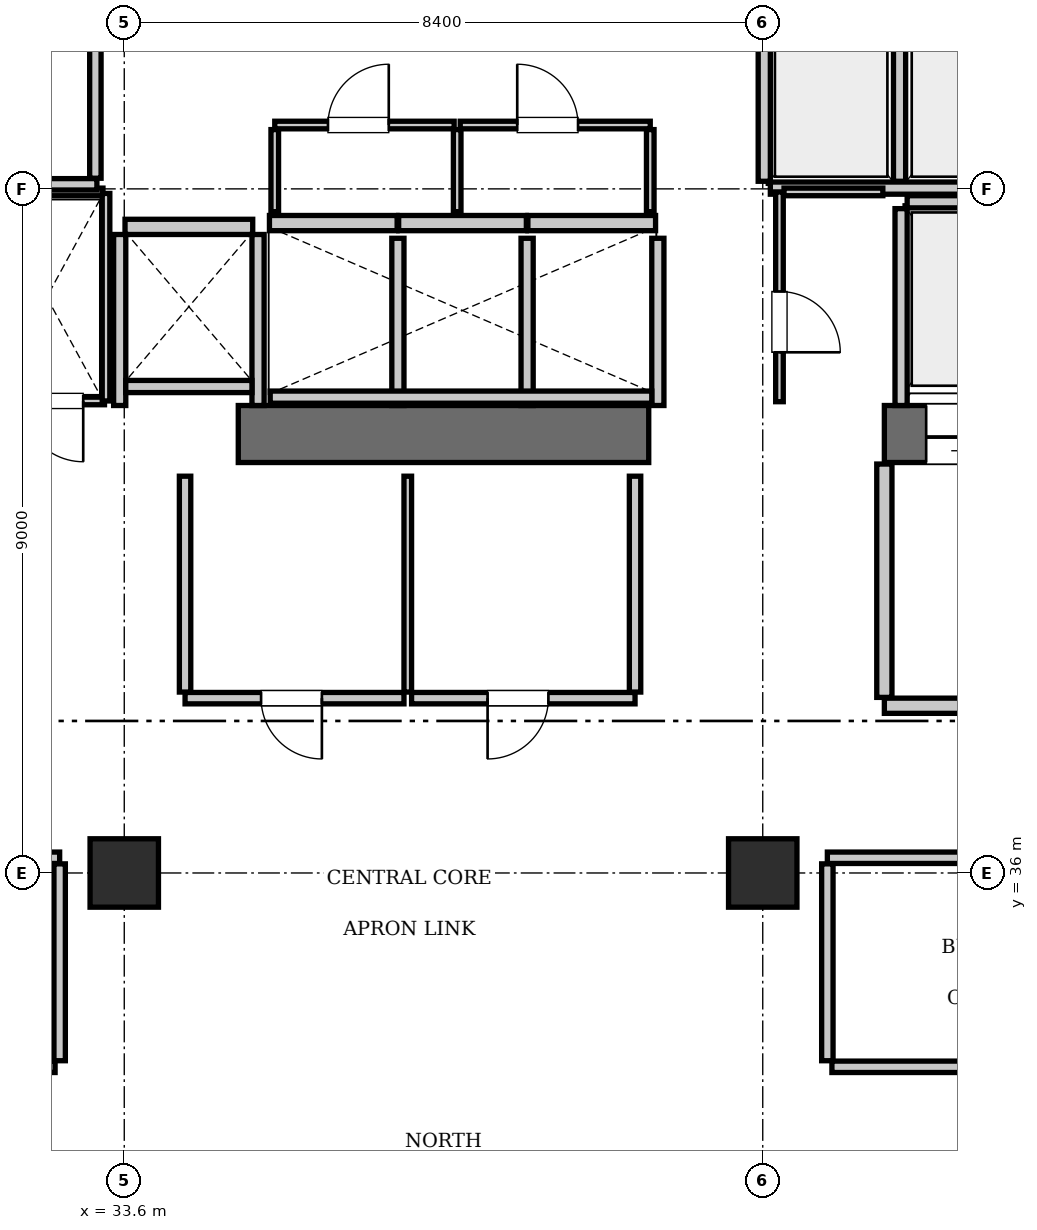
"""IFC4 building model, lengths in metres.
Left out: names, types, materials, properties, quantities, classifications, styles, units other than length and angle.
Written with IfcOpenShell. Run it as: python <this file> out.ifc"""

import sys

from ifc_helpers import new_model, si_unit, direction, frame, frame_2d, origin, origin_2d, place, context, subcontext, project, spatial, rectangle, extrude, element, fill, save


model = new_model("IFC4")
c1 = context("Model", 3, precision=1e-05, world=origin(), true_north=direction((0.0, 1.0)))
c2 = subcontext(c1, "Body", "Model", "MODEL_VIEW")
j1 = project(units=[si_unit("LENGTHUNIT", "METRE"), si_unit("PLANEANGLEUNIT", "RADIAN")], contexts=[c1])
p1 = place(None, origin())
s1 = spatial("IfcSite", under=j1, at=p1, CompositionType="ELEMENT")
p2 = place(p1, origin())
s2 = spatial("IfcBuilding", under=s1, at=p2, CompositionType="ELEMENT")
p3 = place(p2, frame((0.0, 0.0, 135.1)))
s3 = spatial("IfcBuildingStorey", under=s2, at=p3, CompositionType="ELEMENT", Elevation=135.1)
p4 = place(p3, frame((35.1, 41.775, 0.0), z_axis=(0.0, 0.0, 1.0), x_axis=(1.0, 0.0, 0.0)))
e1 = element("IfcWall", 1, at=p4, inside=s3, PredefinedType="SHEAR", context=c2, shape_type="SweptSolid", body=[
    extrude(rectangle(XDim=5.4, YDim=0.75, at=frame_2d((2.7, 0.0))), origin(), (0.0, 0.0, 1.0), 3.85),
])
p5 = place(p3, frame((43.6, 41.775, 0.0), z_axis=(0.0, 0.0, 1.0), x_axis=(1.0, 0.0, 0.0)))
e2 = element("IfcWall", 2, at=p5, inside=s3, PredefinedType="SHEAR", context=c2, shape_type="SweptSolid", body=[
    extrude(rectangle(XDim=6.8, YDim=0.75, at=frame_2d((3.4, 0.0))), origin(), (0.0, 0.0, 1.0), 3.85),
])
p6 = place(p5, frame((3.9, 0.0, 0.0)))
e3 = element("IfcOpeningElement", 3, at=p6, cuts=e2, PredefinedType="OPENING", context=c2, shape_type="SweptSolid", body=[
    extrude(rectangle(XDim=1.15, YDim=2.15, at=frame_2d((0.575, 1.075))), frame((0.0, 0.385, 0.0), z_axis=(0.0, -1.0, 0.0), x_axis=(1.0, 0.0, 0.0)), (0.0, 0.0, 1.0), 0.77),
])
p7 = place(p5, frame((0.55, 0.0, 0.0)))
e4 = element("IfcOpeningElement", 4, at=p7, cuts=e2, PredefinedType="OPENING", context=c2, shape_type="SweptSolid", body=[
    extrude(rectangle(XDim=1.1, YDim=2.2, at=frame_2d((0.55, 1.1))), frame((0.0, 0.385, 0.0), z_axis=(0.0, -1.0, 0.0), x_axis=(1.0, 0.0, 0.0)), (0.0, 0.0, 1.0), 0.77),
])
for number, where, z_axis, x_axis in (
    (5, (33.6, 36.0, 0.0), (0.0, 0.0, 1.0), (1.0, 0.0, 0.0)),
    (6, (42.0, 36.0, 0.0), (0.0, 0.0, 1.0), (1.0, 0.0, 0.0)),
):
    element("IfcColumn", number, at=place(p3, frame(where, z_axis=z_axis, x_axis=x_axis)), inside=s3, PredefinedType="COLUMN", context=c2, shape_type="SweptSolid", body=[
        extrude(rectangle(XDim=0.9, YDim=0.9, at=origin_2d()), origin(), (0.0, 0.0, 1.0), 3.85),
    ])
for number, where, z_axis, x_axis in (
    (7, (35.51, 44.55, 0.0), (0.0, 0.0, 1.0), (1.0, 0.0, 0.0)),
    (8, (37.21, 44.55, 0.0), (0.0, 0.0, 1.0), (1.0, 0.0, 0.0)),
):
    element("IfcWall", number, at=place(p3, frame(where, z_axis=z_axis, x_axis=x_axis)), inside=s3, PredefinedType="SOLIDWALL", context=c2, shape_type="SweptSolid", body=[
        extrude(rectangle(XDim=1.68, YDim=0.2, at=frame_2d((0.84, 0.0))), origin(), (0.0, 0.0, 1.0), 3.61),
    ])
p8 = place(p3, frame((38.91, 44.55, 0.0), z_axis=(0.0, 0.0, 1.0), x_axis=(1.0, 0.0, 0.0)))
e9 = element("IfcWall", 9, at=p8, inside=s3, PredefinedType="SOLIDWALL", context=c2, shape_type="SweptSolid", body=[
    extrude(rectangle(XDim=1.68, YDim=0.2, at=frame_2d((0.84, 0.0))), origin(), (0.0, 0.0, 1.0), 3.61),
])
p9 = place(p3, frame((33.61, 44.5, 0.0), z_axis=(0.0, 0.0, 1.0), x_axis=(1.0, 0.0, 0.0)))
e10 = element("IfcWall", 10, at=p9, inside=s3, PredefinedType="SOLIDWALL", context=c2, shape_type="SweptSolid", body=[
    extrude(rectangle(XDim=1.68, YDim=0.2, at=frame_2d((0.84, 0.0))), origin(), (0.0, 0.0, 1.0), 3.61),
])
p10 = place(p3, frame((43.9, 44.83, 0.0), z_axis=(0.0, 0.0, 1.0), x_axis=(1.0, 0.0, 0.0)))
e11 = element("IfcWall", 11, at=p10, inside=s3, PredefinedType="SOLIDWALL", context=c2, shape_type="SweptSolid", body=[
    extrude(rectangle(XDim=1.6, YDim=0.16, at=frame_2d((0.8, 0.0))), origin(), (0.0, 0.0, 1.0), 3.61),
])
p11 = place(p3, frame((43.82, 42.15, 0.0), z_axis=(0.0, 0.0, 1.0), x_axis=(0.0, 1.0, 0.0)))
e12 = element("IfcWall", 12, at=p11, inside=s3, PredefinedType="SOLIDWALL", context=c2, shape_type="SweptSolid", body=[
    extrude(rectangle(XDim=2.59, YDim=0.16, at=frame_2d((1.295, 0.0))), origin(), (0.0, 0.0, 1.0), 3.61),
])
for number, where, z_axis, x_axis in (
    (13, (42.02, 45.1, 0.0), (0.0, 0.0, 1.0), (0.0, 1.0, 0.0)),
    (14, (43.8, 45.1, 0.0), (0.0, 0.0, 1.0), (0.0, 1.0, 0.0)),
):
    element("IfcWall", number, at=place(p3, frame(where, z_axis=z_axis, x_axis=x_axis)), inside=s3, PredefinedType="SOLIDWALL", context=c2, shape_type="SweptSolid", body=[
        extrude(rectangle(XDim=1.95, YDim=0.16, at=frame_2d((0.975, 0.0))), origin(), (0.0, 0.0, 1.0), 3.61),
    ])
p12 = place(p3, frame((42.1, 45.01, 0.0), z_axis=(0.0, 0.0, 1.0), x_axis=(1.0, 0.0, 0.0)))
e15 = element("IfcWall", 15, at=p12, inside=s3, PredefinedType="SOLIDWALL", context=c2, shape_type="SweptSolid", body=[
    extrude(rectangle(XDim=3.45, YDim=0.16, at=frame_2d((1.725, 0.0))), origin(), (0.0, 0.0, 1.0), 3.61),
])
for number, where, z_axis, x_axis in (
    (16, (37.2, 42.15, 0.0), (0.0, 0.0, 1.0), (0.0, 1.0, 0.0)),
    (17, (38.9, 42.15, 0.0), (0.0, 0.0, 1.0), (0.0, 1.0, 0.0)),
    (18, (40.62, 42.15, 0.0), (0.0, 0.0, 1.0), (0.0, 1.0, 0.0)),
):
    element("IfcWall", number, at=place(p3, frame(where, z_axis=z_axis, x_axis=x_axis)), inside=s3, PredefinedType="SOLIDWALL", context=c2, shape_type="SweptSolid", body=[
        extrude(rectangle(XDim=2.2, YDim=0.16, at=frame_2d((1.1, 0.0))), origin(), (0.0, 0.0, 1.0), 3.61),
    ])
p13 = place(p3, frame((35.52, 42.26, 0.0), z_axis=(0.0, 0.0, 1.0), x_axis=(1.0, 0.0, 0.0)))
e19 = element("IfcWall", 19, at=p13, inside=s3, PredefinedType="SOLIDWALL", context=c2, shape_type="SweptSolid", body=[
    extrude(rectangle(XDim=5.02, YDim=0.16, at=frame_2d((2.51, 0.0))), origin(), (0.0, 0.0, 1.0), 3.61),
])
for number, where, z_axis, x_axis in (
    (20, (33.54, 42.15, 0.0), (0.0, 0.0, 1.0), (0.0, 1.0, 0.0)),
    (21, (35.36, 42.15, 0.0), (0.0, 0.0, 1.0), (0.0, 1.0, 0.0)),
):
    element("IfcWall", number, at=place(p3, frame(where, z_axis=z_axis, x_axis=x_axis)), inside=s3, PredefinedType="SOLIDWALL", context=c2, shape_type="SweptSolid", body=[
        extrude(rectangle(XDim=2.25, YDim=0.16, at=frame_2d((1.125, 0.0))), origin(), (0.0, 0.0, 1.0), 3.61),
    ])
p14 = place(p3, frame((33.62, 42.4, 0.0), z_axis=(0.0, 0.0, 1.0), x_axis=(1.0, 0.0, 0.0)))
e22 = element("IfcWall", 22, at=p14, inside=s3, PredefinedType="SOLIDWALL", context=c2, shape_type="SweptSolid", body=[
    extrude(rectangle(XDim=1.66, YDim=0.16, at=frame_2d((0.83, 0.0))), origin(), (0.0, 0.0, 1.0), 3.61),
])
p15 = place(p3, frame((43.6, 38.2, 0.0), z_axis=(0.0, 0.0, 1.0), x_axis=(1.0, 0.0, 0.0)))
e23 = element("IfcWall", 23, at=p15, inside=s3, PredefinedType="PARTITIONING", context=c2, shape_type="SweptSolid", body=[
    extrude(rectangle(XDim=5.8, YDim=0.2, at=frame_2d((2.9, 0.0))), origin(), (0.0, 0.0, 1.0), 3.61),
])
p16 = place(p15, frame((2.3, 0.0, 0.0)))
e24 = element("IfcOpeningElement", 24, at=p16, cuts=e23, PredefinedType="OPENING", context=c2, shape_type="SweptSolid", body=[
    extrude(rectangle(XDim=1.15, YDim=2.15, at=frame_2d((0.575, 1.075))), frame((0.0, 0.11, 0.0), z_axis=(0.0, -1.0, 0.0), x_axis=(1.0, 0.0, 0.0)), (0.0, 0.0, 1.0), 0.22),
])
p17 = place(p3, frame((43.6, 38.31, 0.0), z_axis=(0.0, 0.0, 1.0), x_axis=(0.0, 1.0, 0.0)))
e25 = element("IfcWall", 25, at=p17, inside=s3, PredefinedType="PARTITIONING", context=c2, shape_type="SweptSolid", body=[
    extrude(rectangle(XDim=3.07, YDim=0.2, at=frame_2d((1.535, 0.0))), origin(), (0.0, 0.0, 1.0), 3.61),
])
p18 = place(p3, frame((32.02, 42.21, 0.0), z_axis=(0.0, 0.0, 1.0), x_axis=(1.0, 0.0, 0.0)))
e26 = element("IfcWall", 26, at=p18, inside=s3, PredefinedType="PARTITIONING", context=c2, shape_type="SweptSolid", body=[
    extrude(rectangle(XDim=1.32, YDim=0.1, at=frame_2d((0.66, 0.0))), origin(), (0.0, 0.0, 1.0), 3.61),
])
p19 = place(p18, frame((0.24, 0.0, 0.0)))
e27 = element("IfcOpeningElement", 27, at=p19, cuts=e26, PredefinedType="OPENING", context=c2, shape_type="SweptSolid", body=[
    extrude(rectangle(XDim=0.8, YDim=2.05, at=frame_2d((0.4, 1.025))), frame((0.0, 0.06, 0.0), z_axis=(0.0, -1.0, 0.0), x_axis=(1.0, 0.0, 0.0)), (0.0, 0.0, 1.0), 0.12),
])
p20 = place(p3, frame((31.84, 44.96, 0.0), z_axis=(0.0, 0.0, 1.0), x_axis=(1.0, 0.0, 0.0)))
e28 = element("IfcWall", 28, at=p20, inside=s3, PredefinedType="PARTITIONING", context=c2, shape_type="SweptSolid", body=[
    extrude(rectangle(XDim=1.48, YDim=0.1, at=frame_2d((0.74, 0.0))), origin(), (0.0, 0.0, 1.0), 3.61),
])
p21 = place(p3, frame((33.36, 42.21, 0.0), z_axis=(0.0, 0.0, 1.0), x_axis=(0.0, 1.0, 0.0)))
e29 = element("IfcWall", 29, at=p21, inside=s3, PredefinedType="PARTITIONING", context=c2, shape_type="SweptSolid", body=[
    extrude(rectangle(XDim=2.73, YDim=0.1, at=frame_2d((1.365, 0.0))), origin(), (0.0, 0.0, 1.0), 3.61),
])
p22 = place(p3, frame((35.58, 45.84, 0.0), z_axis=(0.0, 0.0, 1.0), x_axis=(1.0, 0.0, 0.0)))
e30 = element("IfcWall", 30, at=p22, inside=s3, PredefinedType="PARTITIONING", context=c2, shape_type="SweptSolid", body=[
    extrude(rectangle(XDim=2.36, YDim=0.1, at=frame_2d((1.18, 0.0))), origin(), (0.0, 0.0, 1.0), 3.61),
])
p23 = place(p22, frame((0.7, 0.0, 0.0)))
e31 = element("IfcOpeningElement", 31, at=p23, cuts=e30, PredefinedType="OPENING", context=c2, shape_type="SweptSolid", body=[
    extrude(rectangle(XDim=0.8, YDim=2.05, at=frame_2d((0.4, 1.025))), frame((0.0, 0.06, 0.0), z_axis=(0.0, -1.0, 0.0), x_axis=(1.0, 0.0, 0.0)), (0.0, 0.0, 1.0), 0.12),
])
p24 = place(p3, frame((38.02, 45.84, 0.0), z_axis=(0.0, 0.0, 1.0), x_axis=(1.0, 0.0, 0.0)))
e32 = element("IfcWall", 32, at=p24, inside=s3, PredefinedType="PARTITIONING", context=c2, shape_type="SweptSolid", body=[
    extrude(rectangle(XDim=2.5, YDim=0.1, at=frame_2d((1.25, 0.0))), origin(), (0.0, 0.0, 1.0), 3.61),
])
p25 = place(p24, frame((0.75, 0.0, 0.0)))
e33 = element("IfcOpeningElement", 33, at=p25, cuts=e32, PredefinedType="OPENING", context=c2, shape_type="SweptSolid", body=[
    extrude(rectangle(XDim=0.8, YDim=2.05, at=frame_2d((0.4, 1.025))), frame((0.0, 0.06, 0.0), z_axis=(0.0, -1.0, 0.0), x_axis=(1.0, 0.0, 0.0)), (0.0, 0.0, 1.0), 0.12),
])
for number, where, z_axis, x_axis in (
    (34, (35.58, 44.7, 0.0), (0.0, 0.0, 1.0), (0.0, 1.0, 0.0)),
    (35, (37.98, 44.7, 0.0), (0.0, 0.0, 1.0), (0.0, 1.0, 0.0)),
    (36, (40.52, 44.7, 0.0), (0.0, 0.0, 1.0), (0.0, 1.0, 0.0)),
):
    element("IfcWall", number, at=place(p3, frame(where, z_axis=z_axis, x_axis=x_axis)), inside=s3, PredefinedType="PARTITIONING", context=c2, shape_type="SweptSolid", body=[
        extrude(rectangle(XDim=1.08, YDim=0.1, at=frame_2d((0.54, 0.0))), origin(), (0.0, 0.0, 1.0), 3.61),
    ])
p26 = place(p3, frame((42.22, 42.2, 0.0), z_axis=(0.0, 0.0, 1.0), x_axis=(0.0, 1.0, 0.0)))
e37 = element("IfcWall", 37, at=p26, inside=s3, PredefinedType="PARTITIONING", context=c2, shape_type="SweptSolid", body=[
    extrude(rectangle(XDim=2.76, YDim=0.1, at=frame_2d((1.38, 0.0))), origin(), (0.0, 0.0, 1.0), 3.61),
])
p27 = place(p26, frame((0.65, 0.0, 0.0)))
e38 = element("IfcOpeningElement", 38, at=p27, cuts=e37, PredefinedType="OPENING", context=c2, shape_type="SweptSolid", body=[
    extrude(rectangle(XDim=0.8, YDim=2.05, at=frame_2d((0.4, 1.025))), frame((0.0, 0.06, 0.0), z_axis=(0.0, -1.0, 0.0), x_axis=(1.0, 0.0, 0.0)), (0.0, 0.0, 1.0), 0.12),
])
p28 = place(p3, frame((42.28, 44.96, 0.0), z_axis=(0.0, 0.0, 1.0), x_axis=(1.0, 0.0, 0.0)))
e39 = element("IfcWall", 39, at=p28, inside=s3, PredefinedType="PARTITIONING", context=c2, shape_type="SweptSolid", body=[
    extrude(rectangle(XDim=1.3, YDim=0.1, at=frame_2d((0.65, 0.0))), origin(), (0.0, 0.0, 1.0), 3.61),
])
p29 = place(p3, frame((30.06, 45.06, 0.0), z_axis=(0.0, 0.0, 1.0), x_axis=(1.0, 0.0, 0.0)))
e40 = element("IfcWall", 40, at=p29, inside=s3, PredefinedType="PARTITIONING", context=c2, shape_type="SweptSolid", body=[
    extrude(rectangle(XDim=3.18, YDim=0.15, at=frame_2d((1.59, 0.0))), origin(), (0.0, 0.0, 1.0), 3.61),
])
p30 = place(p3, frame((33.22, 45.14, 0.0), z_axis=(0.0, 0.0, 1.0), x_axis=(0.0, 1.0, 0.0)))
e41 = element("IfcWall", 41, at=p30, inside=s3, PredefinedType="PARTITIONING", context=c2, shape_type="SweptSolid", body=[
    extrude(rectangle(XDim=4.16, YDim=0.15, at=frame_2d((2.08, 0.0))), origin(), (0.0, 0.0, 1.0), 3.61),
])
p31 = place(p3, frame((34.4, 38.3, 0.0), z_axis=(0.0, 0.0, 1.0), x_axis=(1.0, 0.0, 0.0)))
e42 = element("IfcWall", 42, at=p31, inside=s3, PredefinedType="PARTITIONING", context=c2, shape_type="SweptSolid", body=[
    extrude(rectangle(XDim=2.88, YDim=0.15, at=frame_2d((1.44, 0.0))), origin(), (0.0, 0.0, 1.0), 3.61),
])
p32 = place(p31, frame((1.0, 0.0, 0.0)))
e43 = element("IfcOpeningElement", 43, at=p32, cuts=e42, PredefinedType="OPENING", context=c2, shape_type="SweptSolid", body=[
    extrude(rectangle(XDim=0.8, YDim=2.05, at=frame_2d((0.4, 1.025))), frame((0.0, 0.085, 0.0), z_axis=(0.0, -1.0, 0.0), x_axis=(1.0, 0.0, 0.0)), (0.0, 0.0, 1.0), 0.17),
])
p33 = place(p3, frame((37.38, 38.3, 0.0), z_axis=(0.0, 0.0, 1.0), x_axis=(1.0, 0.0, 0.0)))
e44 = element("IfcWall", 44, at=p33, inside=s3, PredefinedType="PARTITIONING", context=c2, shape_type="SweptSolid", body=[
    extrude(rectangle(XDim=2.94, YDim=0.15, at=frame_2d((1.47, 0.0))), origin(), (0.0, 0.0, 1.0), 3.61),
])
p34 = place(p33, frame((1.0, 0.0, 0.0)))
e45 = element("IfcOpeningElement", 45, at=p34, cuts=e44, PredefinedType="OPENING", context=c2, shape_type="SweptSolid", body=[
    extrude(rectangle(XDim=0.8, YDim=2.05, at=frame_2d((0.4, 1.025))), frame((0.0, 0.085, 0.0), z_axis=(0.0, -1.0, 0.0), x_axis=(1.0, 0.0, 0.0)), (0.0, 0.0, 1.0), 0.17),
])
p35 = place(p3, frame((34.4, 38.38, 0.0), z_axis=(0.0, 0.0, 1.0), x_axis=(0.0, 1.0, 0.0)))
e46 = element("IfcWall", 46, at=p35, inside=s3, PredefinedType="PARTITIONING", context=c2, shape_type="SweptSolid", body=[
    extrude(rectangle(XDim=2.84, YDim=0.15, at=frame_2d((1.42, 0.0))), origin(), (0.0, 0.0, 1.0), 3.61),
])
p36 = place(p3, frame((37.33, 38.38, 0.0), z_axis=(0.0, 0.0, 1.0), x_axis=(0.0, 1.0, 0.0)))
e47 = element("IfcWall", 47, at=p36, inside=s3, PredefinedType="PARTITIONING", context=c2, shape_type="SweptSolid", body=[
    extrude(rectangle(XDim=2.84, YDim=0.1, at=frame_2d((1.42, 0.0))), origin(), (0.0, 0.0, 1.0), 3.61),
])
p37 = place(p3, frame((40.32, 38.38, 0.0), z_axis=(0.0, 0.0, 1.0), x_axis=(0.0, 1.0, 0.0)))
e48 = element("IfcWall", 48, at=p37, inside=s3, PredefinedType="PARTITIONING", context=c2, shape_type="SweptSolid", body=[
    extrude(rectangle(XDim=2.84, YDim=0.15, at=frame_2d((1.42, 0.0))), origin(), (0.0, 0.0, 1.0), 3.61),
])
p38 = place(p3, frame((28.32, 36.2, 0.0), z_axis=(0.0, 0.0, 1.0), x_axis=(1.0, 0.0, 0.0)))
e49 = element("IfcWall", 49, at=p38, inside=s3, PredefinedType="PARTITIONING", context=c2, shape_type="SweptSolid", body=[
    extrude(rectangle(XDim=4.43, YDim=0.15, at=frame_2d((2.215, 0.0))), origin(), (0.0, 0.0, 1.0), 3.61),
])
p39 = place(p3, frame((32.75, 33.53, 0.0), z_axis=(0.0, 0.0, 1.0), x_axis=(0.0, 1.0, 0.0)))
e50 = element("IfcWall", 50, at=p39, inside=s3, PredefinedType="PARTITIONING", context=c2, shape_type="SweptSolid", body=[
    extrude(rectangle(XDim=2.59, YDim=0.15, at=frame_2d((1.295, 0.0))), origin(), (0.0, 0.0, 1.0), 3.61),
])
p40 = place(p3, frame((28.38, 33.45, 0.0), z_axis=(0.0, 0.0, 1.0), x_axis=(1.0, 0.0, 0.0)))
e51 = element("IfcWall", 51, at=p40, inside=s3, PredefinedType="PARTITIONING", context=c2, shape_type="SweptSolid", body=[
    extrude(rectangle(XDim=4.31, YDim=0.15, at=frame_2d((2.155, 0.0))), origin(), (0.0, 0.0, 1.0), 3.61),
])
p41 = place(p40, frame((1.705, 0.0, 0.0)))
e52 = element("IfcOpeningElement", 52, at=p41, cuts=e51, PredefinedType="OPENING", context=c2, shape_type="SweptSolid", body=[
    extrude(rectangle(XDim=0.9, YDim=2.1, at=frame_2d((0.45, 1.05))), frame((0.0, 0.085, 0.0), z_axis=(0.0, -1.0, 0.0), x_axis=(1.0, 0.0, 0.0)), (0.0, 0.0, 1.0), 0.17),
])
p42 = place(p3, frame((42.85, 36.2, 0.0), z_axis=(0.0, 0.0, 1.0), x_axis=(1.0, 0.0, 0.0)))
e53 = element("IfcWall", 53, at=p42, inside=s3, PredefinedType="PARTITIONING", context=c2, shape_type="SweptSolid", body=[
    extrude(rectangle(XDim=4.43, YDim=0.15, at=frame_2d((2.215, 0.0))), origin(), (0.0, 0.0, 1.0), 3.61),
])
p43 = place(p3, frame((42.85, 33.53, 0.0), z_axis=(0.0, 0.0, 1.0), x_axis=(0.0, 1.0, 0.0)))
e54 = element("IfcWall", 54, at=p43, inside=s3, PredefinedType="PARTITIONING", context=c2, shape_type="SweptSolid", body=[
    extrude(rectangle(XDim=2.59, YDim=0.15, at=frame_2d((1.295, 0.0))), origin(), (0.0, 0.0, 1.0), 3.61),
])
p44 = place(p3, frame((42.91, 33.45, 0.0), z_axis=(0.0, 0.0, 1.0), x_axis=(1.0, 0.0, 0.0)))
e55 = element("IfcWall", 55, at=p44, inside=s3, PredefinedType="PARTITIONING", context=c2, shape_type="SweptSolid", body=[
    extrude(rectangle(XDim=4.31, YDim=0.15, at=frame_2d((2.155, 0.0))), origin(), (0.0, 0.0, 1.0), 3.61),
])
p45 = place(p44, frame((1.705, 0.0, 0.0)))
e56 = element("IfcOpeningElement", 56, at=p45, cuts=e55, PredefinedType="OPENING", context=c2, shape_type="SweptSolid", body=[
    extrude(rectangle(XDim=0.9, YDim=2.1, at=frame_2d((0.45, 1.05))), frame((0.0, 0.085, 0.0), z_axis=(0.0, -1.0, 0.0), x_axis=(1.0, 0.0, 0.0)), (0.0, 0.0, 1.0), 0.17),
])
p46 = place(p7, frame((1.1, 0.0, 0.0), z_axis=(0.0, 0.0, 1.0), x_axis=(-1.0, 0.0, 0.0)))
e57 = element("IfcDoor", 57, at=p46, inside=s3, OperationType="SLIDING_TO_LEFT", PredefinedType="DOOR", context=c2, shape_type="SweptSolid", body=[
    extrude(rectangle(XDim=1.1, YDim=2.2, at=frame_2d((0.55, 1.1))), frame((0.0, 0.025, 0.0), z_axis=(0.0, -1.0, 0.0), x_axis=(1.0, 0.0, 0.0)), (0.0, 0.0, 1.0), 0.05),
])
fill(e4, e57)
p47 = place(p19, frame((0.8, 0.0, 0.0), z_axis=(0.0, 0.0, 1.0), x_axis=(-1.0, 0.0, 0.0)))
e58 = element("IfcDoor", 58, at=p47, inside=s3, OperationType="SINGLE_SWING_LEFT", PredefinedType="DOOR", context=c2, shape_type="SweptSolid", body=[
    extrude(rectangle(XDim=0.8, YDim=2.05, at=frame_2d((0.4, 1.025))), frame((0.0, 0.025, 0.0), z_axis=(0.0, -1.0, 0.0), x_axis=(1.0, 0.0, 0.0)), (0.0, 0.0, 1.0), 0.05),
])
fill(e27, e58)
p48 = place(p23, origin())
e59 = element("IfcDoor", 59, at=p48, inside=s3, OperationType="SINGLE_SWING_RIGHT", PredefinedType="DOOR", context=c2, shape_type="SweptSolid", body=[
    extrude(rectangle(XDim=0.8, YDim=2.05, at=frame_2d((0.4, 1.025))), frame((0.0, 0.025, 0.0), z_axis=(0.0, -1.0, 0.0), x_axis=(1.0, 0.0, 0.0)), (0.0, 0.0, 1.0), 0.05),
])
fill(e31, e59)
p49 = place(p25, origin())
e60 = element("IfcDoor", 60, at=p49, inside=s3, OperationType="SINGLE_SWING_LEFT", PredefinedType="DOOR", context=c2, shape_type="SweptSolid", body=[
    extrude(rectangle(XDim=0.8, YDim=2.05, at=frame_2d((0.4, 1.025))), frame((0.0, 0.025, 0.0), z_axis=(0.0, -1.0, 0.0), x_axis=(1.0, 0.0, 0.0)), (0.0, 0.0, 1.0), 0.05),
])
fill(e33, e60)
p50 = place(p27, frame((0.8, 0.0, 0.0), z_axis=(0.0, 0.0, 1.0), x_axis=(-1.0, 0.0, 0.0)))
e61 = element("IfcDoor", 61, at=p50, inside=s3, OperationType="SINGLE_SWING_RIGHT", PredefinedType="DOOR", context=c2, shape_type="SweptSolid", body=[
    extrude(rectangle(XDim=0.8, YDim=2.05, at=frame_2d((0.4, 1.025))), frame((0.0, 0.025, 0.0), z_axis=(0.0, -1.0, 0.0), x_axis=(1.0, 0.0, 0.0)), (0.0, 0.0, 1.0), 0.05),
])
fill(e38, e61)
p51 = place(p32, frame((0.8, 0.0, 0.0), z_axis=(0.0, 0.0, 1.0), x_axis=(-1.0, 0.0, 0.0)))
e62 = element("IfcDoor", 62, at=p51, inside=s3, OperationType="SINGLE_SWING_LEFT", PredefinedType="DOOR", context=c2, shape_type="SweptSolid", body=[
    extrude(rectangle(XDim=0.8, YDim=2.05, at=frame_2d((0.4, 1.025))), frame((0.0, 0.025, 0.0), z_axis=(0.0, -1.0, 0.0), x_axis=(1.0, 0.0, 0.0)), (0.0, 0.0, 1.0), 0.05),
])
fill(e43, e62)
p52 = place(p34, frame((0.8, 0.0, 0.0), z_axis=(0.0, 0.0, 1.0), x_axis=(-1.0, 0.0, 0.0)))
e63 = element("IfcDoor", 63, at=p52, inside=s3, OperationType="SINGLE_SWING_RIGHT", PredefinedType="DOOR", context=c2, shape_type="SweptSolid", body=[
    extrude(rectangle(XDim=0.8, YDim=2.05, at=frame_2d((0.4, 1.025))), frame((0.0, 0.025, 0.0), z_axis=(0.0, -1.0, 0.0), x_axis=(1.0, 0.0, 0.0)), (0.0, 0.0, 1.0), 0.05),
])
fill(e45, e63)
save(model, sys.argv[1])
